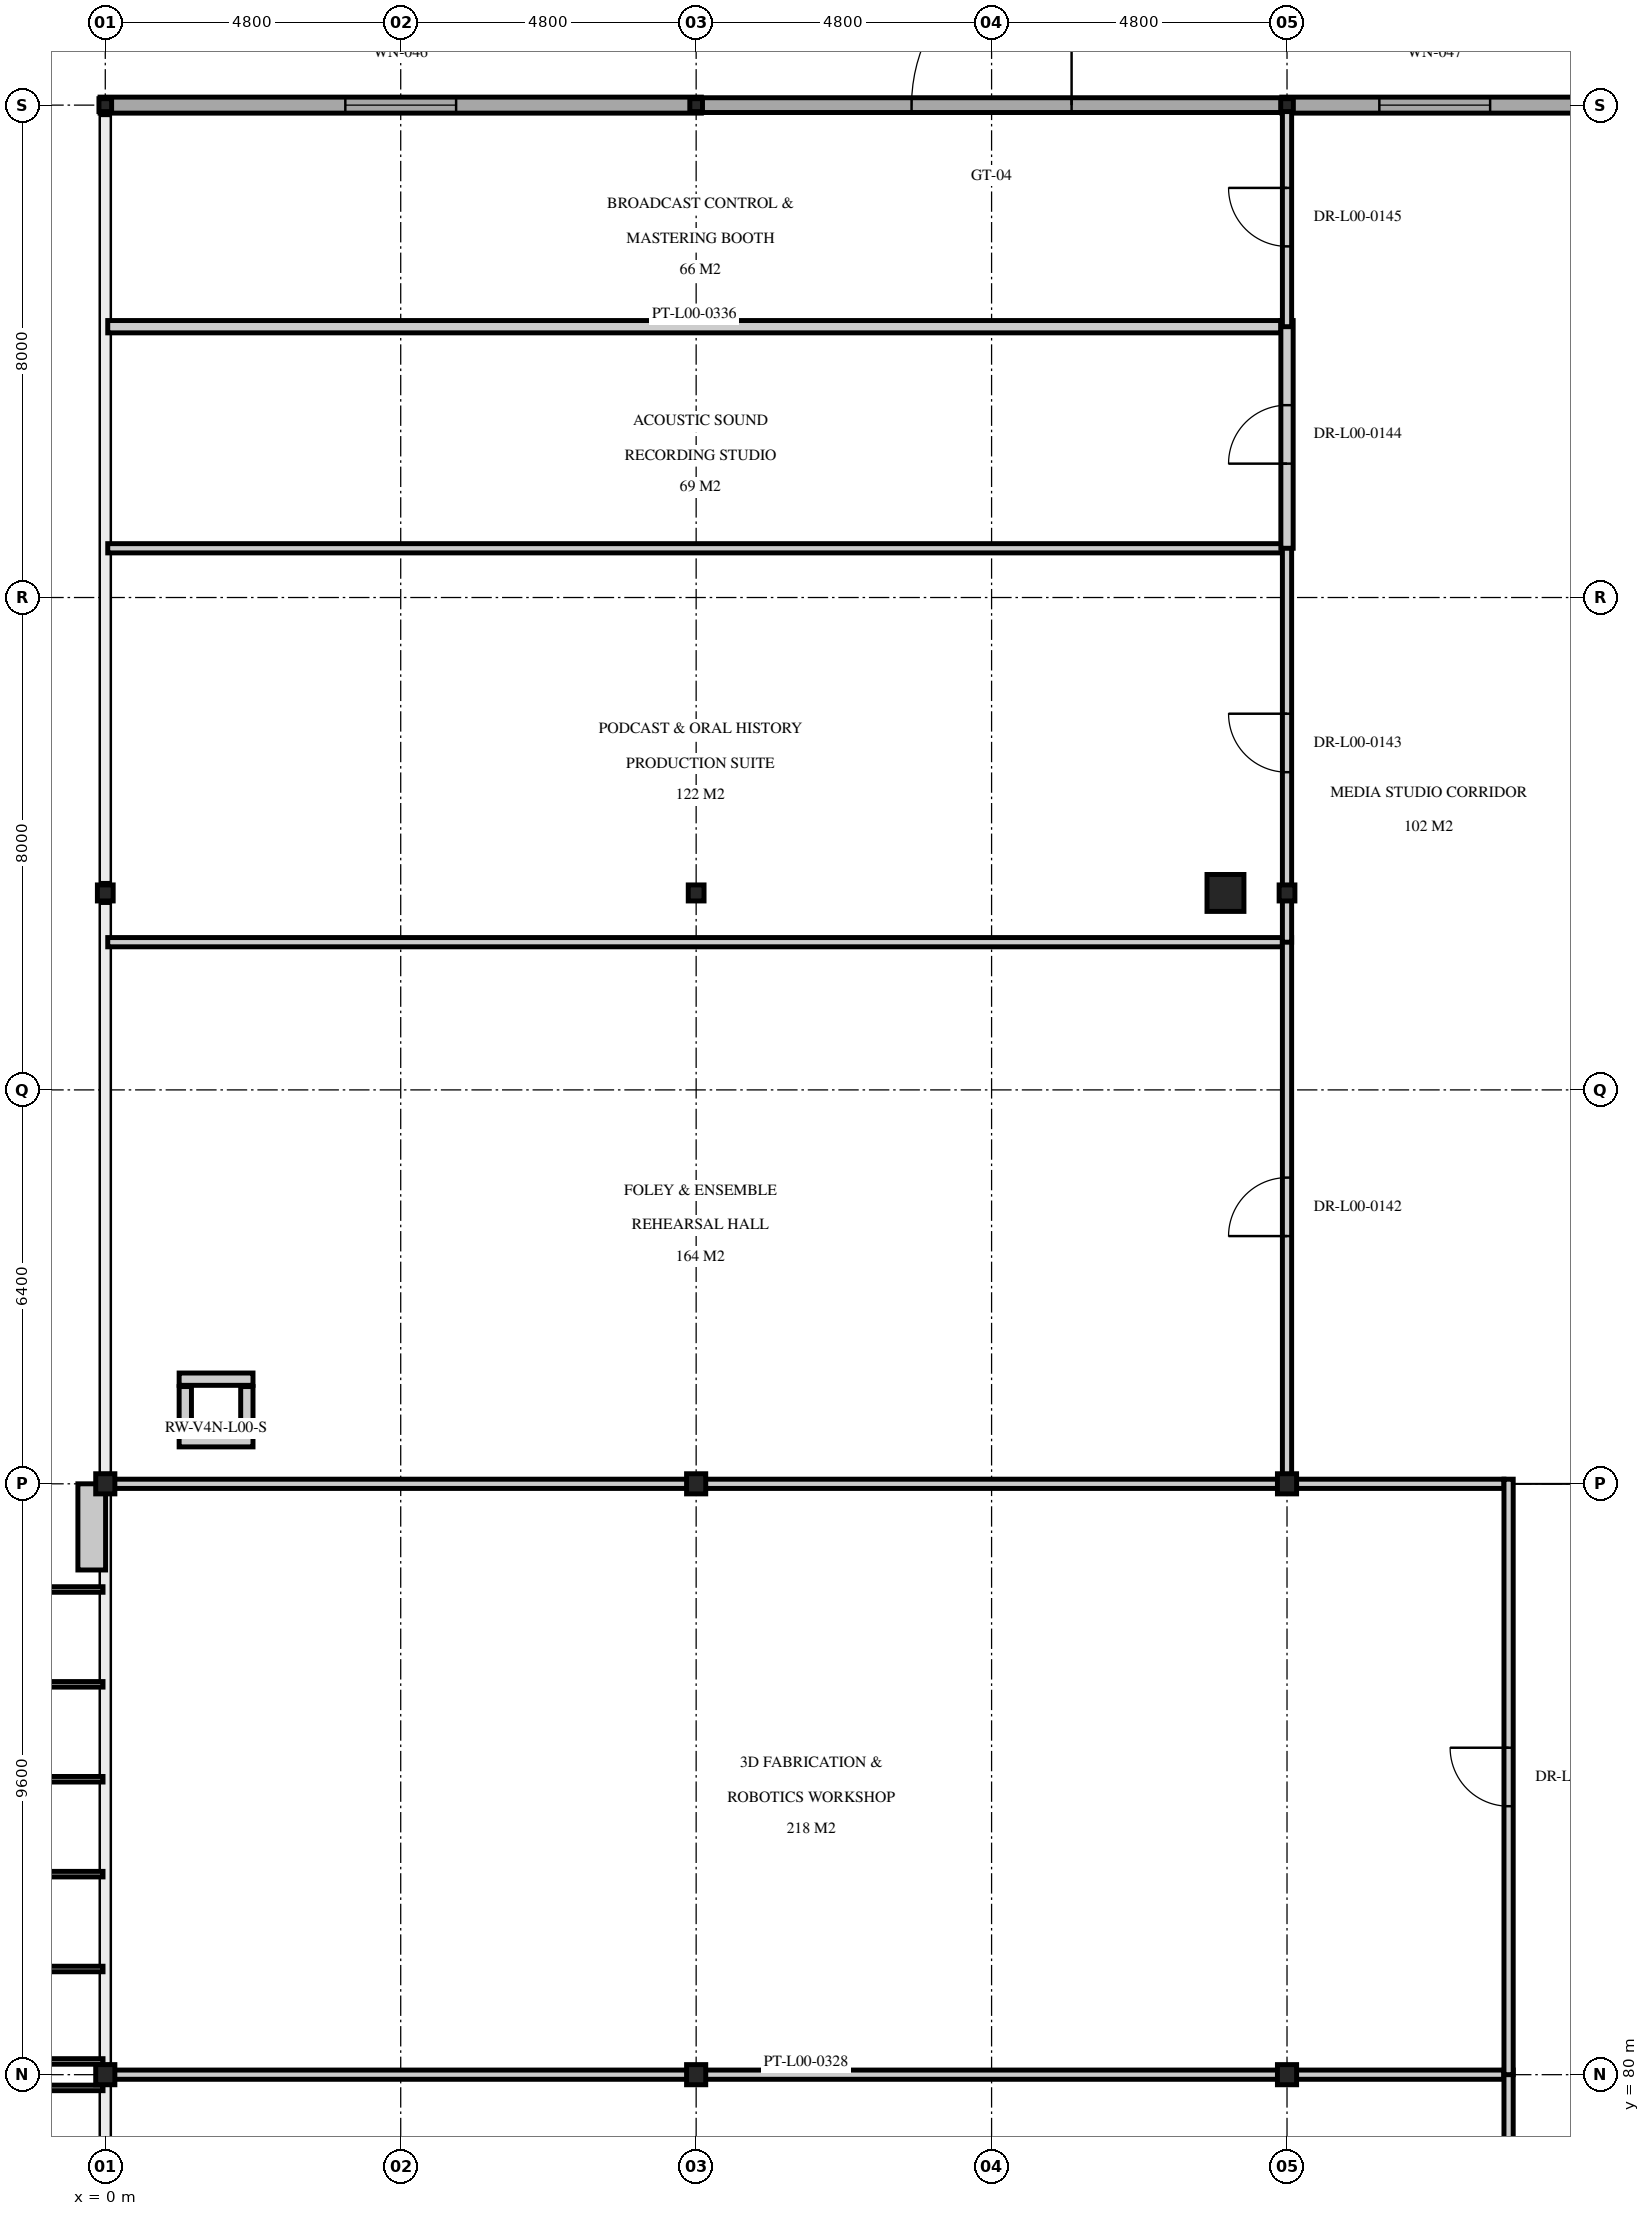
"""IFC4 building model, lengths in metres.
Left out: names, types, materials, properties, quantities, classifications, styles, units other than length and angle.
Written with IfcOpenShell. Run it as: python <this file> out.ifc"""

import sys

from ifc_helpers import new_model, si_unit, direction, frame, frame_2d, origin, origin_2d, place, context, subcontext, project, spatial, rectangle, i_section, extrude, element, fill, save


model = new_model("IFC4")
c1 = context("Model", 3, precision=1e-05, world=origin(), true_north=direction((0.0, 1.0)))
c2 = subcontext(c1, "Body", "Model", "MODEL_VIEW")
j1 = project(units=[si_unit("LENGTHUNIT", "METRE"), si_unit("PLANEANGLEUNIT", "RADIAN")], contexts=[c1])
p1 = place(None, origin())
s1 = spatial("IfcSite", under=j1, at=p1, CompositionType="ELEMENT")
p2 = place(p1, origin())
s2 = spatial("IfcBuilding", under=s1, at=p2, CompositionType="ELEMENT")
p3 = place(p2, origin())
s3 = spatial("IfcBuildingStorey", under=s2, at=p3, CompositionType="ELEMENT", Elevation=0.0)
for number, where, z_axis, x_axis in (
    (1, (0.0, 80.0, 0.0), (0.0, 0.0, 1.0), (1.0, 0.0, 0.0)),
    (2, (0.0, 89.6, 0.0), (0.0, 0.0, 1.0), (1.0, 0.0, 0.0)),
    (3, (9.6, 80.0, 0.0), (0.0, 0.0, 1.0), (1.0, 0.0, 0.0)),
    (4, (9.6, 89.6, 0.0), (0.0, 0.0, 1.0), (1.0, 0.0, 0.0)),
    (5, (19.2, 80.0, 0.0), (0.0, 0.0, 1.0), (1.0, 0.0, 0.0)),
    (6, (19.2, 89.6, 0.0), (0.0, 0.0, 1.0), (1.0, 0.0, 0.0)),
):
    element("IfcColumn", number, at=place(p3, frame(where, z_axis=z_axis, x_axis=x_axis)), inside=s3, PredefinedType="COLUMN", context=c2, shape_type="SweptSolid", body=[
        extrude(i_section(OverallWidth=0.311, OverallDepth=0.327, WebThickness=0.016, FlangeThickness=0.025, at=origin_2d()), origin(), (0.0, 0.0, 1.0), 5.1),
    ])
p4 = place(p3, frame((0.0, 99.2, 0.0), z_axis=(0.0, 0.0, 1.0), x_axis=(1.0, 0.0, 0.0)))
e7 = element("IfcColumn", 7, at=p4, inside=s3, PredefinedType="COLUMN", context=c2, shape_type="SweptSolid", body=[
    extrude(i_section(OverallWidth=0.256, OverallDepth=0.26, WebThickness=0.01, FlangeThickness=0.017, at=origin_2d()), origin(), (0.0, 0.0, 1.0), 5.1),
])
p5 = place(p3, frame((0.0, 112.0, 0.0), z_axis=(0.0, 0.0, 1.0), x_axis=(1.0, 0.0, 0.0)))
e8 = element("IfcColumn", 8, at=p5, inside=s3, PredefinedType="COLUMN", context=c2, shape_type="SweptSolid", body=[
    extrude(i_section(OverallWidth=0.206, OverallDepth=0.21, WebThickness=0.01, FlangeThickness=0.014, at=origin_2d()), origin(), (0.0, 0.0, 1.0), 4.91),
])
p6 = place(p3, frame((9.6, 99.2, 0.0), z_axis=(0.0, 0.0, 1.0), x_axis=(1.0, 0.0, 0.0)))
e9 = element("IfcColumn", 9, at=p6, inside=s3, PredefinedType="COLUMN", context=c2, shape_type="SweptSolid", body=[
    extrude(i_section(OverallWidth=0.256, OverallDepth=0.26, WebThickness=0.01, FlangeThickness=0.017, at=origin_2d()), origin(), (0.0, 0.0, 1.0), 5.1),
])
p7 = place(p3, frame((9.6, 112.0, 0.0), z_axis=(0.0, 0.0, 1.0), x_axis=(1.0, 0.0, 0.0)))
e10 = element("IfcColumn", 10, at=p7, inside=s3, PredefinedType="COLUMN", context=c2, shape_type="SweptSolid", body=[
    extrude(i_section(OverallWidth=0.206, OverallDepth=0.21, WebThickness=0.01, FlangeThickness=0.014, at=origin_2d()), origin(), (0.0, 0.0, 1.0), 4.91),
])
p8 = place(p3, frame((19.2, 99.2, 0.0), z_axis=(0.0, 0.0, 1.0), x_axis=(1.0, 0.0, 0.0)))
e11 = element("IfcColumn", 11, at=p8, inside=s3, PredefinedType="COLUMN", context=c2, shape_type="SweptSolid", body=[
    extrude(i_section(OverallWidth=0.256, OverallDepth=0.26, WebThickness=0.01, FlangeThickness=0.017, at=origin_2d()), origin(), (0.0, 0.0, 1.0), 5.1),
])
p9 = place(p3, frame((19.2, 112.0, 0.0), z_axis=(0.0, 0.0, 1.0), x_axis=(1.0, 0.0, 0.0)))
e12 = element("IfcColumn", 12, at=p9, inside=s3, PredefinedType="COLUMN", context=c2, shape_type="SweptSolid", body=[
    extrude(i_section(OverallWidth=0.206, OverallDepth=0.21, WebThickness=0.01, FlangeThickness=0.014, at=origin_2d()), origin(), (0.0, 0.0, 1.0), 4.91),
])
p10 = place(p3, frame((18.2, 99.2, 0.0), z_axis=(0.0, 0.0, 1.0), x_axis=(1.0, 0.0, 0.0)))
e13 = element("IfcColumn", 13, at=p10, inside=s3, PredefinedType="COLUMN", context=c2, shape_type="SweptSolid", body=[
    extrude(rectangle(XDim=0.6, YDim=0.6, at=origin_2d()), origin(), (0.0, 0.0, 1.0), 5.1),
])
for number, where, z_axis, x_axis in (
    (14, (2.4, 90.3, 0.0), (0.0, 0.0, 1.0), (-1.0, 0.0, 0.0)),
    (15, (1.2, 91.3, 0.0), (0.0, 0.0, 1.0), (1.0, 0.0, 0.0)),
):
    element("IfcWall", number, at=place(p3, frame(where, z_axis=z_axis, x_axis=x_axis)), inside=s3, PredefinedType="PARTITIONING", context=c2, shape_type="SweptSolid", body=[
        extrude(rectangle(XDim=1.2, YDim=0.2, at=frame_2d((0.6, 0.0))), origin(), (0.0, 0.0, 1.0), 4.38),
    ])
for number, where, z_axis, x_axis in (
    (16, (1.3, 90.42, 0.0), (0.0, 0.0, 1.0), (0.0, 1.0, 0.0)),
    (17, (2.3, 91.18, 0.0), (0.0, 0.0, 1.0), (0.0, -1.0, 0.0)),
):
    element("IfcWall", number, at=place(p3, frame(where, z_axis=z_axis, x_axis=x_axis)), inside=s3, PredefinedType="PARTITIONING", context=c2, shape_type="SweptSolid", body=[
        extrude(rectangle(XDim=0.76, YDim=0.2, at=frame_2d((0.38, 0.0))), origin(), (0.0, 0.0, 1.0), 4.38),
    ])
p11 = place(p3, frame((-0.085, 112.0, 0.0), z_axis=(0.0, 0.0, 1.0), x_axis=(1.0, 0.0, 0.0)))
e18 = element("IfcWall", 18, at=p11, inside=s3, PredefinedType="SOLIDWALL", context=c2, shape_type="SweptSolid", body=[
    extrude(rectangle(XDim=9.77, YDim=0.26, at=frame_2d((4.885, 0.0))), origin(), (0.0, 0.0, 1.0), 4.495),
])
p12 = place(p11, frame((3.985, 0.0, 1.0)))
e19 = element("IfcOpeningElement", 19, at=p12, cuts=e18, PredefinedType="OPENING", context=c2, shape_type="SweptSolid", body=[
    extrude(rectangle(XDim=1.8, YDim=2.1, at=frame_2d((0.9, 1.05))), frame((0.0, 0.14, 0.0), z_axis=(0.0, -1.0, 0.0), x_axis=(1.0, 0.0, 0.0)), (0.0, 0.0, 1.0), 0.28),
])
p13 = place(p3, frame((9.515, 112.0, 0.0), z_axis=(0.0, 0.0, 1.0), x_axis=(1.0, 0.0, 0.0)))
e20 = element("IfcWall", 20, at=p13, inside=s3, PredefinedType="SOLIDWALL", context=c2, shape_type="SweptSolid", body=[
    extrude(rectangle(XDim=9.77, YDim=0.24, at=frame_2d((4.885, 0.0))), origin(), (0.0, 0.0, 1.0), 4.495),
])
p14 = place(p13, frame((3.585, 0.0, 0.0)))
e21 = element("IfcOpeningElement", 21, at=p14, cuts=e20, PredefinedType="OPENING", context=c2, shape_type="SweptSolid", body=[
    extrude(rectangle(XDim=2.6, YDim=2.6, at=frame_2d((1.3, 1.3))), frame((0.0, 0.13, 0.0), z_axis=(0.0, -1.0, 0.0), x_axis=(1.0, 0.0, 0.0)), (0.0, 0.0, 1.0), 0.26),
])
p15 = place(p3, frame((19.115, 112.0, 0.0), z_axis=(0.0, 0.0, 1.0), x_axis=(1.0, 0.0, 0.0)))
e22 = element("IfcWall", 22, at=p15, inside=s3, PredefinedType="SOLIDWALL", context=c2, shape_type="SweptSolid", body=[
    extrude(rectangle(XDim=4.97, YDim=0.26, at=frame_2d((2.485, 0.0))), origin(), (0.0, 0.0, 1.0), 4.495),
])
p16 = place(p15, frame((1.585, 0.0, 1.0)))
e23 = element("IfcOpeningElement", 23, at=p16, cuts=e22, PredefinedType="OPENING", context=c2, shape_type="SweptSolid", body=[
    extrude(rectangle(XDim=1.8, YDim=2.1, at=frame_2d((0.9, 1.05))), frame((0.0, 0.14, 0.0), z_axis=(0.0, -1.0, 0.0), x_axis=(1.0, 0.0, 0.0)), (0.0, 0.0, 1.0), 0.28),
])
p17 = place(p3, frame((0.04, 80.0, 0.0), z_axis=(0.0, 0.0, 1.0), x_axis=(1.0, 0.0, 0.0)))
e24 = element("IfcWall", 24, at=p17, inside=s3, PredefinedType="PARTITIONING", context=c2, shape_type="SweptSolid", body=[
    extrude(rectangle(XDim=22.685, YDim=0.15, at=frame_2d((11.343, 0.0))), origin(), (0.0, 0.0, 1.0), 4.355),
])
p18 = place(p3, frame((22.8, 70.4, 0.0), z_axis=(0.0, 0.0, 1.0), x_axis=(0.0, 1.0, 0.0)))
e25 = element("IfcWall", 25, at=p18, inside=s3, PredefinedType="PARTITIONING", context=c2, shape_type="SweptSolid", body=[
    extrude(rectangle(XDim=9.675, YDim=0.15, at=frame_2d((4.837, 0.0))), origin(), (0.0, 0.0, 1.0), 4.355),
])
p19 = place(p18, frame((4.362, 0.0, 0.0)))
e26 = element("IfcOpeningElement", 26, at=p19, cuts=e25, PredefinedType="OPENING", context=c2, shape_type="SweptSolid", body=[
    extrude(rectangle(XDim=0.95, YDim=2.15, at=frame_2d((0.475, 1.075))), frame((0.0, 0.085, 0.0), z_axis=(0.0, -1.0, 0.0), x_axis=(1.0, 0.0, 0.0)), (0.0, 0.0, 1.0), 0.17),
])
p20 = place(p3, frame((0.04, 89.6, 0.0), z_axis=(0.0, 0.0, 1.0), x_axis=(1.0, 0.0, 0.0)))
e27 = element("IfcWall", 27, at=p20, inside=s3, PredefinedType="PARTITIONING", context=c2, shape_type="SweptSolid", body=[
    extrude(rectangle(XDim=22.685, YDim=0.15, at=frame_2d((11.343, 0.0))), origin(), (0.0, 0.0, 1.0), 4.355),
])
p21 = place(p3, frame((22.8, 80.0, 0.0), z_axis=(0.0, 0.0, 1.0), x_axis=(0.0, 1.0, 0.0)))
e28 = element("IfcWall", 28, at=p21, inside=s3, PredefinedType="PARTITIONING", context=c2, shape_type="SweptSolid", body=[
    extrude(rectangle(XDim=9.675, YDim=0.15, at=frame_2d((4.837, 0.0))), origin(), (0.0, 0.0, 1.0), 4.355),
])
p22 = place(p21, frame((4.362, 0.0, 0.0)))
e29 = element("IfcOpeningElement", 29, at=p22, cuts=e28, PredefinedType="OPENING", context=c2, shape_type="SweptSolid", body=[
    extrude(rectangle(XDim=0.95, YDim=2.15, at=frame_2d((0.475, 1.075))), frame((0.0, 0.085, 0.0), z_axis=(0.0, -1.0, 0.0), x_axis=(1.0, 0.0, 0.0)), (0.0, 0.0, 1.0), 0.17),
])
p23 = place(p3, frame((0.04, 98.4, 0.0), z_axis=(0.0, 0.0, 1.0), x_axis=(1.0, 0.0, 0.0)))
e30 = element("IfcWall", 30, at=p23, inside=s3, PredefinedType="PARTITIONING", context=c2, shape_type="SweptSolid", body=[
    extrude(rectangle(XDim=19.085, YDim=0.15, at=frame_2d((9.542, 0.0))), origin(), (0.0, 0.0, 1.0), 4.552),
])
p24 = place(p3, frame((19.2, 89.725, 0.0), z_axis=(0.0, 0.0, 1.0), x_axis=(0.0, 1.0, 0.0)))
e31 = element("IfcWall", 31, at=p24, inside=s3, PredefinedType="PARTITIONING", context=c2, shape_type="SweptSolid", body=[
    extrude(rectangle(XDim=8.75, YDim=0.15, at=frame_2d((4.375, 0.0))), origin(), (0.0, 0.0, 1.0), 4.355),
])
p25 = place(p24, frame((3.9, 0.0, 0.0)))
e32 = element("IfcOpeningElement", 32, at=p25, cuts=e31, PredefinedType="OPENING", context=c2, shape_type="SweptSolid", body=[
    extrude(rectangle(XDim=0.95, YDim=2.15, at=frame_2d((0.475, 1.075))), frame((0.0, 0.085, 0.0), z_axis=(0.0, -1.0, 0.0), x_axis=(1.0, 0.0, 0.0)), (0.0, 0.0, 1.0), 0.17),
])
p26 = place(p3, frame((0.04, 104.8, 0.0), z_axis=(0.0, 0.0, 1.0), x_axis=(1.0, 0.0, 0.0)))
e33 = element("IfcWall", 33, at=p26, inside=s3, PredefinedType="PARTITIONING", context=c2, shape_type="SweptSolid", body=[
    extrude(rectangle(XDim=19.085, YDim=0.15, at=frame_2d((9.542, 0.0))), origin(), (0.0, 0.0, 1.0), 4.525),
])
p27 = place(p3, frame((19.2, 98.4, 0.0), z_axis=(0.0, 0.0, 1.0), x_axis=(0.0, 1.0, 0.0)))
e34 = element("IfcWall", 34, at=p27, inside=s3, PredefinedType="PARTITIONING", context=c2, shape_type="SweptSolid", body=[
    extrude(rectangle(XDim=6.475, YDim=0.15, at=frame_2d((3.238, 0.0))), origin(), (0.0, 0.0, 1.0), 4.495),
])
p28 = place(p27, frame((2.762, 0.0, 0.0)))
e35 = element("IfcOpeningElement", 35, at=p28, cuts=e34, PredefinedType="OPENING", context=c2, shape_type="SweptSolid", body=[
    extrude(rectangle(XDim=0.95, YDim=2.15, at=frame_2d((0.475, 1.075))), frame((0.0, 0.085, 0.0), z_axis=(0.0, -1.0, 0.0), x_axis=(1.0, 0.0, 0.0)), (0.0, 0.0, 1.0), 0.17),
])
p29 = place(p3, frame((0.04, 108.4, 0.0), z_axis=(0.0, 0.0, 1.0), x_axis=(1.0, 0.0, 0.0)))
e36 = element("IfcWall", 36, at=p29, inside=s3, PredefinedType="PARTITIONING", context=c2, shape_type="SweptSolid", body=[
    extrude(rectangle(XDim=19.06, YDim=0.2, at=frame_2d((9.53, 0.0))), origin(), (0.0, 0.0, 1.0), 4.525),
])
p30 = place(p3, frame((19.2, 104.8, 0.0), z_axis=(0.0, 0.0, 1.0), x_axis=(0.0, 1.0, 0.0)))
e37 = element("IfcWall", 37, at=p30, inside=s3, PredefinedType="PARTITIONING", context=c2, shape_type="SweptSolid", body=[
    extrude(rectangle(XDim=3.7, YDim=0.2, at=frame_2d((1.85, 0.0))), origin(), (0.0, 0.0, 1.0), 4.525),
])
p31 = place(p30, frame((1.375, 0.0, 0.0)))
e38 = element("IfcOpeningElement", 38, at=p31, cuts=e37, PredefinedType="OPENING", context=c2, shape_type="SweptSolid", body=[
    extrude(rectangle(XDim=0.95, YDim=2.15, at=frame_2d((0.475, 1.075))), frame((0.0, 0.11, 0.0), z_axis=(0.0, -1.0, 0.0), x_axis=(1.0, 0.0, 0.0)), (0.0, 0.0, 1.0), 0.22),
])
p32 = place(p3, frame((19.2, 108.4, 0.0), z_axis=(0.0, 0.0, 1.0), x_axis=(0.0, 1.0, 0.0)))
e39 = element("IfcWall", 39, at=p32, inside=s3, PredefinedType="PARTITIONING", context=c2, shape_type="SweptSolid", body=[
    extrude(rectangle(XDim=3.56, YDim=0.15, at=frame_2d((1.78, 0.0))), origin(), (0.0, 0.0, 1.0), 4.495),
])
p33 = place(p32, frame((1.305, 0.0, 0.0)))
e40 = element("IfcOpeningElement", 40, at=p33, cuts=e39, PredefinedType="OPENING", context=c2, shape_type="SweptSolid", body=[
    extrude(rectangle(XDim=0.95, YDim=2.15, at=frame_2d((0.475, 1.075))), frame((0.0, 0.085, 0.0), z_axis=(0.0, -1.0, 0.0), x_axis=(1.0, 0.0, 0.0)), (0.0, 0.0, 1.0), 0.17),
])
p34 = place(p12, origin())
e41 = element("IfcWindow", 41, at=p34, inside=s3, PartitioningType="SINGLE_PANEL", PredefinedType="WINDOW", context=c2, shape_type="SweptSolid", body=[
    extrude(rectangle(XDim=1.8, YDim=2.1, at=frame_2d((0.9, 1.05))), frame((0.0, 0.03, 0.0), z_axis=(0.0, -1.0, 0.0), x_axis=(1.0, 0.0, 0.0)), (0.0, 0.0, 1.0), 0.06),
])
fill(e19, e41)
p35 = place(p14, origin())
e42 = element("IfcDoor", 42, at=p35, inside=s3, OperationType="DOUBLE_DOOR_SINGLE_SWING", PredefinedType="GATE", context=c2, shape_type="SweptSolid", body=[
    extrude(rectangle(XDim=2.6, YDim=2.6, at=frame_2d((1.3, 1.3))), frame((0.0, 0.025, 0.0), z_axis=(0.0, -1.0, 0.0), x_axis=(1.0, 0.0, 0.0)), (0.0, 0.0, 1.0), 0.05),
])
fill(e21, e42)
p36 = place(p16, origin())
e43 = element("IfcWindow", 43, at=p36, inside=s3, PartitioningType="SINGLE_PANEL", PredefinedType="WINDOW", context=c2, shape_type="SweptSolid", body=[
    extrude(rectangle(XDim=1.8, YDim=2.1, at=frame_2d((0.9, 1.05))), frame((0.0, 0.03, 0.0), z_axis=(0.0, -1.0, 0.0), x_axis=(1.0, 0.0, 0.0)), (0.0, 0.0, 1.0), 0.06),
])
fill(e23, e43)
p37 = place(p22, origin())
e44 = element("IfcDoor", 44, at=p37, inside=s3, OperationType="SINGLE_SWING_RIGHT", PredefinedType="DOOR", context=c2, shape_type="SweptSolid", body=[
    extrude(rectangle(XDim=0.95, YDim=2.15, at=frame_2d((0.475, 1.075))), frame((0.0, 0.025, 0.0), z_axis=(0.0, -1.0, 0.0), x_axis=(1.0, 0.0, 0.0)), (0.0, 0.0, 1.0), 0.05),
])
fill(e29, e44)
p38 = place(p25, origin())
e45 = element("IfcDoor", 45, at=p38, inside=s3, OperationType="SINGLE_SWING_LEFT", PredefinedType="DOOR", context=c2, shape_type="SweptSolid", body=[
    extrude(rectangle(XDim=0.95, YDim=2.15, at=frame_2d((0.475, 1.075))), frame((0.0, 0.025, 0.0), z_axis=(0.0, -1.0, 0.0), x_axis=(1.0, 0.0, 0.0)), (0.0, 0.0, 1.0), 0.05),
])
fill(e32, e45)
p39 = place(p28, origin())
e46 = element("IfcDoor", 46, at=p39, inside=s3, OperationType="SINGLE_SWING_RIGHT", PredefinedType="DOOR", context=c2, shape_type="SweptSolid", body=[
    extrude(rectangle(XDim=0.95, YDim=2.15, at=frame_2d((0.475, 1.075))), frame((0.0, 0.025, 0.0), z_axis=(0.0, -1.0, 0.0), x_axis=(1.0, 0.0, 0.0)), (0.0, 0.0, 1.0), 0.05),
])
fill(e35, e46)
p40 = place(p31, origin())
e47 = element("IfcDoor", 47, at=p40, inside=s3, OperationType="SINGLE_SWING_LEFT", PredefinedType="DOOR", context=c2, shape_type="SweptSolid", body=[
    extrude(rectangle(XDim=0.95, YDim=2.15, at=frame_2d((0.475, 1.075))), frame((0.0, 0.025, 0.0), z_axis=(0.0, -1.0, 0.0), x_axis=(1.0, 0.0, 0.0)), (0.0, 0.0, 1.0), 0.05),
])
fill(e38, e47)
p41 = place(p33, origin())
e48 = element("IfcDoor", 48, at=p41, inside=s3, OperationType="SINGLE_SWING_RIGHT", PredefinedType="DOOR", context=c2, shape_type="SweptSolid", body=[
    extrude(rectangle(XDim=0.95, YDim=2.15, at=frame_2d((0.475, 1.075))), frame((0.0, 0.025, 0.0), z_axis=(0.0, -1.0, 0.0), x_axis=(1.0, 0.0, 0.0)), (0.0, 0.0, 1.0), 0.05),
])
fill(e40, e48)
save(model, sys.argv[1])
